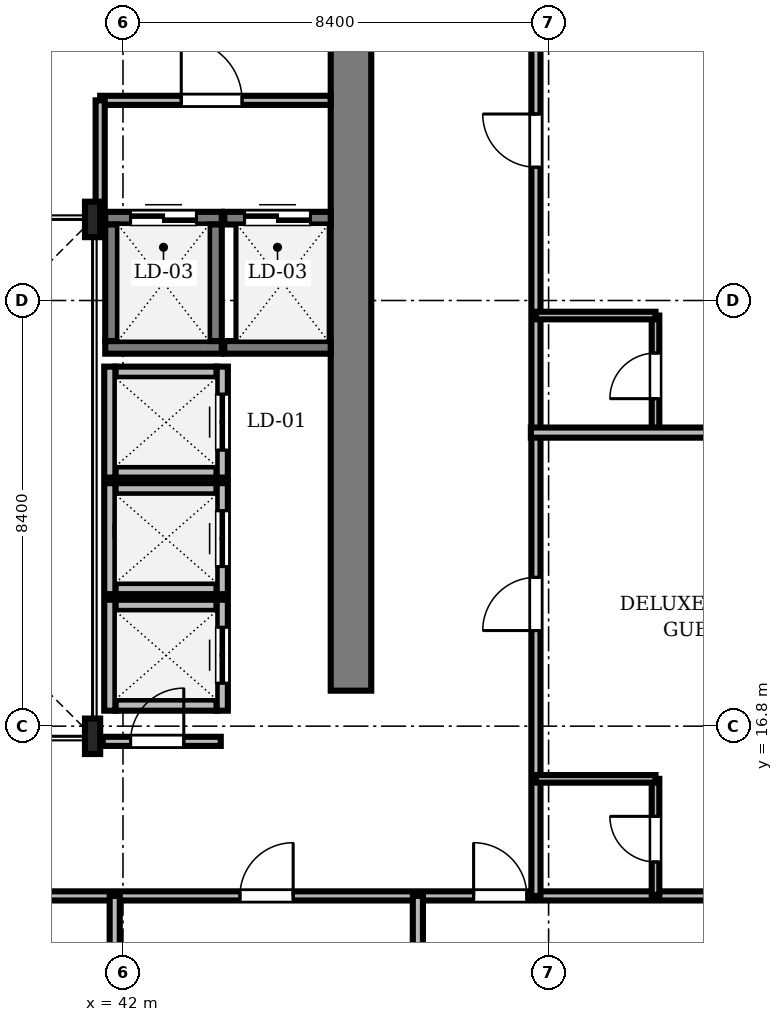
"""IFC4 building model, lengths in metres.
Left out: names, types, materials, properties, quantities, classifications, styles, units other than length and angle.
Written with IfcOpenShell. Run it as: python <this file> out.ifc"""

import sys

from ifc_helpers import new_model, si_unit, direction, frame, frame_2d, origin, origin_2d, place, context, subcontext, project, spatial, rectangle, i_section, extrude, source, transform, mapped, element, fill, save


model = new_model("IFC4")
c1 = context("Model", 3, precision=1e-05, world=origin(), true_north=direction((0.0, 1.0)))
c2 = subcontext(c1, "Body", "Model", "MODEL_VIEW")
j1 = project(units=[si_unit("LENGTHUNIT", "METRE"), si_unit("PLANEANGLEUNIT", "RADIAN")], contexts=[c1])
p1 = place(None, origin())
s1 = spatial("IfcSite", under=j1, at=p1, CompositionType="ELEMENT")
p2 = place(p1, origin())
s2 = spatial("IfcBuilding", under=s1, at=p2, CompositionType="ELEMENT")
p3 = place(p2, frame((0.0, 0.0, 203.55)))
s3 = spatial("IfcBuildingStorey", under=s2, at=p3, CompositionType="ELEMENT", Elevation=203.55)
m1 = source(origin(), c2, "Body", "SweptSolid", [
    extrude(rectangle(XDim=13.15, YDim=0.8, at=frame_2d((6.575, 0.0))), origin(), (0.0, 0.0, 1.0), 3.53),
])
p4 = place(p3, frame((46.5, 17.5, 0.0), z_axis=(0.0, 0.0, 1.0), x_axis=(0.0, 1.0, 0.0)))
e1 = element("IfcWall", 1, at=p4, inside=s3, PredefinedType="SHEAR", context=c2, shape_type="MappedRepresentation", body=[
    mapped(m1, transform((0.0, 0.0, 0.0), scale=1.0)),
])
m2 = source(origin(), c2, "Body", "SweptSolid", [
    extrude(i_section(OverallWidth=0.3, OverallDepth=0.7, WebThickness=0.017, FlangeThickness=0.032, FilletRadius=0.027, at=origin_2d()), origin(), (0.0, 0.0, 1.0), 3.53),
])
for number, where, z_axis, x_axis in (
    (2, (41.4, 16.6, 0.0), (0.0, 0.0, 1.0), (1.0, 0.0, 0.0)),
    (3, (41.4, 26.8, 0.0), (0.0, 0.0, 1.0), (1.0, 0.0, 0.0)),
):
    element("IfcColumn", number, at=place(p3, frame(where, z_axis=z_axis, x_axis=x_axis)), inside=s3, PredefinedType="COLUMN", context=c2, shape_type="MappedRepresentation", body=[
        mapped(m2, transform((0.0, 0.0, 0.0), scale=1.0)),
    ])
m3 = source(origin(), c2, "Body", "SweptSolid", [
    extrude(rectangle(XDim=2.0, YDim=0.22, at=frame_2d((1.0, 0.0))), origin(), (0.0, 0.0, 1.0), 3.53),
])
for number, where, z_axis, x_axis in (
    (4, (41.85, 21.815, 0.0), (0.0, 0.0, 1.0), (1.0, 0.0, 0.0)),
    (5, (41.85, 23.785, 0.0), (0.0, 0.0, 1.0), (1.0, 0.0, 0.0)),
):
    element("IfcWall", number, at=place(p3, frame(where, z_axis=z_axis, x_axis=x_axis)), inside=s3, PredefinedType="SOLIDWALL", context=c2, shape_type="MappedRepresentation", body=[
        mapped(m3, transform((0.0, 0.0, 0.0), scale=1.0)),
    ])
m4 = source(origin(), c2, "Body", "SweptSolid", [
    extrude(rectangle(XDim=2.19, YDim=0.22, at=frame_2d((1.095, 0.0))), origin(), (0.0, 0.0, 1.0), 3.53),
])
p5 = place(p3, frame((41.74, 21.705, 0.0), z_axis=(0.0, 0.0, 1.0), x_axis=(0.0, 1.0, 0.0)))
e6 = element("IfcWall", 6, at=p5, inside=s3, PredefinedType="SOLIDWALL", context=c2, shape_type="MappedRepresentation", body=[
    mapped(m4, transform((0.0, 0.0, 0.0), scale=1.0)),
])
p6 = place(p3, frame((43.96, 21.705, 0.0), z_axis=(0.0, 0.0, 1.0), x_axis=(0.0, 1.0, 0.0)))
e7 = element("IfcWall", 7, at=p6, inside=s3, PredefinedType="SOLIDWALL", context=c2, shape_type="MappedRepresentation", body=[
    mapped(m4, transform((0.0, 0.0, 0.0), scale=1.0)),
])
m5 = source(origin(), c2, "Body", "SweptSolid", [
    extrude(rectangle(XDim=1.1, YDim=2.2, at=frame_2d((0.55, 1.1))), frame((0.0, 0.12, 0.0), z_axis=(0.0, -1.0, 0.0), x_axis=(1.0, 0.0, 0.0)), (0.0, 0.0, 1.0), 0.24),
])
p7 = place(p6, frame((0.545, 0.0, 0.0)))
e8 = element("IfcOpeningElement", 8, at=p7, cuts=e7, PredefinedType="OPENING", context=c2, shape_type="MappedRepresentation", body=[
    mapped(m5, transform((0.0, 0.0, 0.0), scale=1.0)),
])
for number, where, z_axis, x_axis in (
    (9, (41.85, 19.515, 0.0), (0.0, 0.0, 1.0), (1.0, 0.0, 0.0)),
    (10, (41.85, 21.485, 0.0), (0.0, 0.0, 1.0), (1.0, 0.0, 0.0)),
):
    element("IfcWall", number, at=place(p3, frame(where, z_axis=z_axis, x_axis=x_axis)), inside=s3, PredefinedType="SOLIDWALL", context=c2, shape_type="MappedRepresentation", body=[
        mapped(m3, transform((0.0, 0.0, 0.0), scale=1.0)),
    ])
p8 = place(p3, frame((41.74, 19.405, 0.0), z_axis=(0.0, 0.0, 1.0), x_axis=(0.0, 1.0, 0.0)))
e11 = element("IfcWall", 11, at=p8, inside=s3, PredefinedType="SOLIDWALL", context=c2, shape_type="MappedRepresentation", body=[
    mapped(m4, transform((0.0, 0.0, 0.0), scale=1.0)),
])
p9 = place(p3, frame((43.96, 19.405, 0.0), z_axis=(0.0, 0.0, 1.0), x_axis=(0.0, 1.0, 0.0)))
e12 = element("IfcWall", 12, at=p9, inside=s3, PredefinedType="SOLIDWALL", context=c2, shape_type="MappedRepresentation", body=[
    mapped(m4, transform((0.0, 0.0, 0.0), scale=1.0)),
])
p10 = place(p9, frame((0.545, 0.0, 0.0)))
e13 = element("IfcOpeningElement", 13, at=p10, cuts=e12, PredefinedType="OPENING", context=c2, shape_type="MappedRepresentation", body=[
    mapped(m5, transform((0.0, 0.0, 0.0), scale=1.0)),
])
for number, where, z_axis, x_axis in (
    (14, (41.85, 17.215, 0.0), (0.0, 0.0, 1.0), (1.0, 0.0, 0.0)),
    (15, (41.85, 19.185, 0.0), (0.0, 0.0, 1.0), (1.0, 0.0, 0.0)),
):
    element("IfcWall", number, at=place(p3, frame(where, z_axis=z_axis, x_axis=x_axis)), inside=s3, PredefinedType="SOLIDWALL", context=c2, shape_type="MappedRepresentation", body=[
        mapped(m3, transform((0.0, 0.0, 0.0), scale=1.0)),
    ])
p11 = place(p3, frame((41.74, 17.105, 0.0), z_axis=(0.0, 0.0, 1.0), x_axis=(0.0, 1.0, 0.0)))
e16 = element("IfcWall", 16, at=p11, inside=s3, PredefinedType="SOLIDWALL", context=c2, shape_type="MappedRepresentation", body=[
    mapped(m4, transform((0.0, 0.0, 0.0), scale=1.0)),
])
p12 = place(p3, frame((43.96, 17.105, 0.0), z_axis=(0.0, 0.0, 1.0), x_axis=(0.0, 1.0, 0.0)))
e17 = element("IfcWall", 17, at=p12, inside=s3, PredefinedType="SOLIDWALL", context=c2, shape_type="MappedRepresentation", body=[
    mapped(m4, transform((0.0, 0.0, 0.0), scale=1.0)),
])
p13 = place(p12, frame((0.545, 0.0, 0.0)))
e18 = element("IfcOpeningElement", 18, at=p13, cuts=e17, PredefinedType="OPENING", context=c2, shape_type="MappedRepresentation", body=[
    mapped(m5, transform((0.0, 0.0, 0.0), scale=1.0)),
])
m6 = source(origin(), c2, "Body", "SweptSolid", [
    extrude(rectangle(XDim=2.3, YDim=0.25, at=frame_2d((1.15, 0.0))), origin(), (0.0, 0.0, 1.0), 3.53),
])
p14 = place(p3, frame((41.65, 24.275, 0.0), z_axis=(0.0, 0.0, 1.0), x_axis=(1.0, 0.0, 0.0)))
e19 = element("IfcWall", 19, at=p14, inside=s3, PredefinedType="SOLIDWALL", context=c2, shape_type="MappedRepresentation", body=[
    mapped(m6, transform((0.0, 0.0, 0.0), scale=1.0)),
])
p15 = place(p3, frame((41.65, 26.825, 0.0), z_axis=(0.0, 0.0, 1.0), x_axis=(1.0, 0.0, 0.0)))
e20 = element("IfcWall", 20, at=p15, inside=s3, PredefinedType="SOLIDWALL", context=c2, shape_type="MappedRepresentation", body=[
    mapped(m6, transform((0.0, 0.0, 0.0), scale=1.0)),
])
m7 = source(origin(), c2, "Body", "SweptSolid", [
    extrude(rectangle(XDim=1.3, YDim=2.3, at=frame_2d((0.65, 1.15))), frame((0.0, 0.135, 0.0), z_axis=(0.0, -1.0, 0.0), x_axis=(1.0, 0.0, 0.0)), (0.0, 0.0, 1.0), 0.27),
])
p16 = place(p15, frame((0.5, 0.0, 0.0)))
e21 = element("IfcOpeningElement", 21, at=p16, cuts=e20, PredefinedType="OPENING", context=c2, shape_type="MappedRepresentation", body=[
    mapped(m7, transform((0.0, 0.0, 0.0), scale=1.0)),
])
for number, where, z_axis, x_axis in (
    (22, (41.775, 24.4, 0.0), (0.0, 0.0, 1.0), (0.0, 1.0, 0.0)),
    (23, (43.825, 24.4, 0.0), (0.0, 0.0, 1.0), (0.0, 1.0, 0.0)),
):
    element("IfcWall", number, at=place(p3, frame(where, z_axis=z_axis, x_axis=x_axis)), inside=s3, PredefinedType="SOLIDWALL", context=c2, shape_type="MappedRepresentation", body=[
        mapped(m6, transform((0.0, 0.0, 0.0), scale=1.0)),
    ])
m8 = source(origin(), c2, "Body", "SweptSolid", [
    extrude(rectangle(XDim=2.1, YDim=0.25, at=frame_2d((1.05, 0.0))), origin(), (0.0, 0.0, 1.0), 3.53),
])
p17 = place(p3, frame((44.0, 24.275, 0.0), z_axis=(0.0, 0.0, 1.0), x_axis=(1.0, 0.0, 0.0)))
e24 = element("IfcWall", 24, at=p17, inside=s3, PredefinedType="SOLIDWALL", context=c2, shape_type="MappedRepresentation", body=[
    mapped(m8, transform((0.0, 0.0, 0.0), scale=1.0)),
])
p18 = place(p3, frame((44.0, 26.825, 0.0), z_axis=(0.0, 0.0, 1.0), x_axis=(1.0, 0.0, 0.0)))
e25 = element("IfcWall", 25, at=p18, inside=s3, PredefinedType="SOLIDWALL", context=c2, shape_type="MappedRepresentation", body=[
    mapped(m8, transform((0.0, 0.0, 0.0), scale=1.0)),
])
p19 = place(p18, frame((0.4, 0.0, 0.0)))
e26 = element("IfcOpeningElement", 26, at=p19, cuts=e25, PredefinedType="OPENING", context=c2, shape_type="MappedRepresentation", body=[
    mapped(m7, transform((0.0, 0.0, 0.0), scale=1.0)),
])
m9 = source(origin(), c2, "Body", "SweptSolid", [
    extrude(rectangle(XDim=46.156, YDim=0.18, at=frame_2d((23.078, 0.0))), origin(), (0.0, 0.0, 1.0), 2.772),
])
p20 = place(p3, frame((11.422, 13.45, 0.0), z_axis=(0.0, 0.0, 1.0), x_axis=(1.0, 0.0, 0.0)))
e27 = element("IfcWall", 27, at=p20, inside=s3, PredefinedType="PARTITIONING", context=c2, shape_type="MappedRepresentation", body=[
    mapped(m9, transform((0.0, 0.0, 0.0), scale=1.0)),
])
m10 = source(origin(), c2, "Body", "SweptSolid", [
    extrude(rectangle(XDim=1.05, YDim=2.2, at=frame_2d((0.525, 1.1))), frame((0.0, 0.1, 0.0), z_axis=(0.0, -1.0, 0.0), x_axis=(1.0, 0.0, 0.0)), (0.0, 0.0, 1.0), 0.2),
])
p21 = place(p20, frame((11.118, 0.0, 0.0)))
e28 = element("IfcOpeningElement", 28, at=p21, cuts=e27, PredefinedType="OPENING", context=c2, shape_type="MappedRepresentation", body=[
    mapped(m10, transform((0.0, 0.0, 0.0), scale=1.0)),
])
p22 = place(p20, frame((14.939, 0.0, 0.0)))
e29 = element("IfcOpeningElement", 29, at=p22, cuts=e27, PredefinedType="OPENING", context=c2, shape_type="MappedRepresentation", body=[
    mapped(m10, transform((0.0, 0.0, 0.0), scale=1.0)),
])
p23 = place(p20, frame((20.922, 0.0, 0.0)))
e30 = element("IfcOpeningElement", 30, at=p23, cuts=e27, PredefinedType="OPENING", context=c2, shape_type="MappedRepresentation", body=[
    mapped(m10, transform((0.0, 0.0, 0.0), scale=1.0)),
])
p24 = place(p20, frame((26.904, 0.0, 0.0)))
e31 = element("IfcOpeningElement", 31, at=p24, cuts=e27, PredefinedType="OPENING", context=c2, shape_type="MappedRepresentation", body=[
    mapped(m10, transform((0.0, 0.0, 0.0), scale=1.0)),
])
p25 = place(p20, frame((32.887, 0.0, 0.0)))
e32 = element("IfcOpeningElement", 32, at=p25, cuts=e27, PredefinedType="OPENING", context=c2, shape_type="MappedRepresentation", body=[
    mapped(m10, transform((0.0, 0.0, 0.0), scale=1.0)),
])
p26 = place(p20, frame((37.498, 0.0, 0.0)))
e33 = element("IfcOpeningElement", 33, at=p26, cuts=e27, PredefinedType="OPENING", context=c2, shape_type="MappedRepresentation", body=[
    mapped(m10, transform((0.0, 0.0, 0.0), scale=1.0)),
])
m11 = source(origin(), c2, "Body", "SweptSolid", [
    extrude(rectangle(XDim=27.65, YDim=0.18, at=frame_2d((13.825, 0.0))), origin(), (0.0, 0.0, 1.0), 2.972),
])
p27 = place(p3, frame((50.15, 13.45, 0.0), z_axis=(0.0, 0.0, 1.0), x_axis=(0.0, 1.0, 0.0)))
e34 = element("IfcWall", 34, at=p27, inside=s3, PredefinedType="PARTITIONING", context=c2, shape_type="MappedRepresentation", body=[
    mapped(m11, transform((0.0, 0.0, 0.0), scale=1.0)),
])
p28 = place(p27, frame((5.237, 0.0, 0.0)))
e35 = element("IfcOpeningElement", 35, at=p28, cuts=e34, PredefinedType="OPENING", context=c2, shape_type="MappedRepresentation", body=[
    mapped(m10, transform((0.0, 0.0, 0.0), scale=1.0)),
])
p29 = place(p27, frame((14.38, 0.0, 0.0)))
e36 = element("IfcOpeningElement", 36, at=p29, cuts=e34, PredefinedType="OPENING", context=c2, shape_type="MappedRepresentation", body=[
    mapped(m10, transform((0.0, 0.0, 0.0), scale=1.0)),
])
p30 = place(p27, frame((23.523, 0.0, 0.0)))
e37 = element("IfcOpeningElement", 37, at=p30, cuts=e34, PredefinedType="OPENING", context=c2, shape_type="MappedRepresentation", body=[
    mapped(m10, transform((0.0, 0.0, 0.0), scale=1.0)),
])
m12 = source(origin(), c2, "Body", "SweptSolid", [
    extrude(rectangle(XDim=4.548, YDim=0.18, at=frame_2d((2.274, 0.0))), origin(), (0.0, 0.0, 1.0), 3.162),
])
p31 = place(p3, frame((41.55, 29.15, 0.0), z_axis=(0.0, 0.0, 1.0), x_axis=(1.0, 0.0, 0.0)))
e38 = element("IfcWall", 38, at=p31, inside=s3, PredefinedType="PARTITIONING", context=c2, shape_type="MappedRepresentation", body=[
    mapped(m12, transform((0.0, 0.0, 0.0), scale=1.0)),
])
m13 = source(origin(), c2, "Body", "SweptSolid", [
    extrude(rectangle(XDim=1.2, YDim=2.2, at=frame_2d((0.6, 1.1))), frame((0.0, 0.1, 0.0), z_axis=(0.0, -1.0, 0.0), x_axis=(1.0, 0.0, 0.0)), (0.0, 0.0, 1.0), 0.2),
])
p32 = place(p31, frame((1.6, 0.0, 0.0)))
e39 = element("IfcOpeningElement", 39, at=p32, cuts=e38, PredefinedType="OPENING", context=c2, shape_type="MappedRepresentation", body=[
    mapped(m13, transform((0.0, 0.0, 0.0), scale=1.0)),
])
m14 = source(origin(), c2, "Body", "SweptSolid", [
    extrude(rectangle(XDim=2.33, YDim=0.18, at=frame_2d((1.165, 0.0))), origin(), (0.0, 0.0, 1.0), 2.972),
])
p33 = place(p3, frame((41.6, 16.5, 0.0), z_axis=(0.0, 0.0, 1.0), x_axis=(1.0, 0.0, 0.0)))
e40 = element("IfcWall", 40, at=p33, inside=s3, PredefinedType="PARTITIONING", context=c2, shape_type="MappedRepresentation", body=[
    mapped(m14, transform((0.0, 0.0, 0.0), scale=1.0)),
])
p34 = place(p33, frame((0.55, 0.0, 0.0)))
e41 = element("IfcOpeningElement", 41, at=p34, cuts=e40, PredefinedType="OPENING", context=c2, shape_type="MappedRepresentation", body=[
    mapped(m10, transform((0.0, 0.0, 0.0), scale=1.0)),
])
m15 = source(origin(), c2, "Body", "SweptSolid", [
    extrude(rectangle(XDim=2.29, YDim=0.15, at=frame_2d((1.145, 0.0))), origin(), (0.0, 0.0, 1.0), 2.972),
])
p35 = place(p3, frame((52.51, 13.47, 0.0), z_axis=(0.0, 0.0, 1.0), x_axis=(0.0, 1.0, 0.0)))
e42 = element("IfcWall", 42, at=p35, inside=s3, PredefinedType="PARTITIONING", context=c2, shape_type="MappedRepresentation", body=[
    mapped(m15, transform((0.0, 0.0, 0.0), scale=1.0)),
])
m16 = source(origin(), c2, "Body", "SweptSolid", [
    extrude(rectangle(XDim=0.9, YDim=2.1, at=frame_2d((0.45, 1.05))), frame((0.0, 0.085, 0.0), z_axis=(0.0, -1.0, 0.0), x_axis=(1.0, 0.0, 0.0)), (0.0, 0.0, 1.0), 0.17),
])
p36 = place(p35, frame((0.65, 0.0, 0.0)))
e43 = element("IfcOpeningElement", 43, at=p36, cuts=e42, PredefinedType="OPENING", context=c2, shape_type="MappedRepresentation", body=[
    mapped(m16, transform((0.0, 0.0, 0.0), scale=1.0)),
])
m17 = source(origin(), c2, "Body", "SweptSolid", [
    extrude(rectangle(XDim=2.29, YDim=0.15, at=frame_2d((1.145, 0.0))), origin(), (0.0, 0.0, 1.0), 3.192),
])
p37 = place(p3, frame((52.51, 22.613, 0.0), z_axis=(0.0, 0.0, 1.0), x_axis=(0.0, 1.0, 0.0)))
e44 = element("IfcWall", 44, at=p37, inside=s3, PredefinedType="PARTITIONING", context=c2, shape_type="MappedRepresentation", body=[
    mapped(m17, transform((0.0, 0.0, 0.0), scale=1.0)),
])
p38 = place(p37, frame((0.65, 0.0, 0.0)))
e45 = element("IfcOpeningElement", 45, at=p38, cuts=e44, PredefinedType="OPENING", context=c2, shape_type="MappedRepresentation", body=[
    mapped(m16, transform((0.0, 0.0, 0.0), scale=1.0)),
])
m18 = source(origin(), c2, "Body", "SweptSolid", [
    extrude(rectangle(XDim=11.328, YDim=0.2, at=frame_2d((5.664, 0.0))), origin(), (0.0, 0.0, 1.0), 2.772),
])
for number, where, z_axis, x_axis in (
    (46, (41.837, 2.122, 0.0), (0.0, 0.0, 1.0), (0.0, 1.0, 0.0)),
    (47, (47.82, 2.122, 0.0), (0.0, 0.0, 1.0), (0.0, 1.0, 0.0)),
):
    element("IfcWall", number, at=place(p3, frame(where, z_axis=z_axis, x_axis=x_axis)), inside=s3, PredefinedType="PARTITIONING", context=c2, shape_type="MappedRepresentation", body=[
        mapped(m18, transform((0.0, 0.0, 0.0), scale=1.0)),
    ])
m19 = source(origin(), c2, "Body", "SweptSolid", [
    extrude(rectangle(XDim=7.72, YDim=0.2, at=frame_2d((3.86, 0.0))), origin(), (0.0, 0.0, 1.0), 2.772),
])
p39 = place(p3, frame((50.05, 22.593, 0.0), z_axis=(0.0, 0.0, 1.0), x_axis=(1.0, 0.0, 0.0)))
e48 = element("IfcWall", 48, at=p39, inside=s3, PredefinedType="PARTITIONING", context=c2, shape_type="MappedRepresentation", body=[
    mapped(m19, transform((0.0, 0.0, 0.0), scale=1.0)),
])
m20 = source(origin(), c2, "Body", "SweptSolid", [
    extrude(rectangle(XDim=2.36, YDim=0.15, at=frame_2d((1.18, 0.0))), origin(), (0.0, 0.0, 1.0), 3.53),
])
for number, where, z_axis, x_axis in (
    (49, (50.15, 15.76, 0.0), (0.0, 0.0, 1.0), (1.0, 0.0, 0.0)),
    (50, (50.15, 24.903, 0.0), (0.0, 0.0, 1.0), (1.0, 0.0, 0.0)),
):
    element("IfcWall", number, at=place(p3, frame(where, z_axis=z_axis, x_axis=x_axis)), inside=s3, PredefinedType="PARTITIONING", context=c2, shape_type="MappedRepresentation", body=[
        mapped(m20, transform((0.0, 0.0, 0.0), scale=1.0)),
    ])
m21 = source(origin(), c2, "Body", "SweptSolid", [
    extrude(rectangle(XDim=2.35, YDim=0.18, at=frame_2d((1.175, 0.0))), origin(), (0.0, 0.0, 1.0), 2.972),
])
p40 = place(p3, frame((41.55, 26.8, 0.0), z_axis=(0.0, 0.0, 1.0), x_axis=(0.0, 1.0, 0.0)))
e51 = element("IfcWall", 51, at=p40, inside=s3, PredefinedType="PARTITIONING", context=c2, shape_type="MappedRepresentation", body=[
    mapped(m21, transform((0.0, 0.0, 0.0), scale=1.0)),
])
m22 = source(origin(), c2, "Body", "SweptSolid", [
    extrude(rectangle(XDim=1.858, YDim=0.18, at=frame_2d((0.929, 0.0))), origin(), (0.0, 0.0, 1.0), 3.53),
])
p41 = place(p3, frame((41.852, 20.65, 0.0), z_axis=(0.0, 0.0, 1.0), x_axis=(1.0, 0.0, 0.0)))
e52 = element("IfcWall", 52, at=p41, inside=s3, PredefinedType="PARTITIONING", context=c2, shape_type="MappedRepresentation", body=[
    mapped(m22, transform((0.0, 0.0, 0.0), scale=1.0)),
])
m23 = source(origin(), c2, "Body", "SweptSolid", [
    extrude(rectangle(XDim=1.1, YDim=2.2, at=frame_2d((0.55, 1.1))), frame((0.0, 0.025, 0.0), z_axis=(0.0, -1.0, 0.0), x_axis=(1.0, 0.0, 0.0)), (0.0, 0.0, 1.0), 0.05),
])
p42 = place(p7, origin())
e53 = element("IfcDoor", 53, at=p42, inside=s3, OperationType="DOUBLE_DOOR_SLIDING", PredefinedType="DOOR", context=c2, shape_type="MappedRepresentation", body=[
    mapped(m23, transform((0.0, 0.0, 0.0), scale=1.0)),
])
fill(e8, e53)
p43 = place(p10, origin())
e54 = element("IfcDoor", 54, at=p43, inside=s3, OperationType="DOUBLE_DOOR_SLIDING", PredefinedType="DOOR", context=c2, shape_type="MappedRepresentation", body=[
    mapped(m23, transform((0.0, 0.0, 0.0), scale=1.0)),
])
fill(e13, e54)
p44 = place(p13, origin())
e55 = element("IfcDoor", 55, at=p44, inside=s3, OperationType="DOUBLE_DOOR_SLIDING", PredefinedType="DOOR", context=c2, shape_type="MappedRepresentation", body=[
    mapped(m23, transform((0.0, 0.0, 0.0), scale=1.0)),
])
fill(e18, e55)
m24 = source(origin(), c2, "Body", "SweptSolid", [
    extrude(rectangle(XDim=1.3, YDim=2.3, at=frame_2d((0.65, 1.15))), frame((0.0, 0.025, 0.0), z_axis=(0.0, -1.0, 0.0), x_axis=(1.0, 0.0, 0.0)), (0.0, 0.0, 1.0), 0.05),
])
p45 = place(p16, origin())
e56 = element("IfcDoor", 56, at=p45, inside=s3, OperationType="DOUBLE_DOOR_SLIDING", PredefinedType="DOOR", context=c2, shape_type="MappedRepresentation", body=[
    mapped(m24, transform((0.0, 0.0, 0.0), scale=1.0)),
])
fill(e21, e56)
p46 = place(p19, origin())
e57 = element("IfcDoor", 57, at=p46, inside=s3, OperationType="DOUBLE_DOOR_SLIDING", PredefinedType="DOOR", context=c2, shape_type="MappedRepresentation", body=[
    mapped(m24, transform((0.0, 0.0, 0.0), scale=1.0)),
])
fill(e26, e57)
m25 = source(origin(), c2, "Body", "SweptSolid", [
    extrude(rectangle(XDim=1.05, YDim=2.2, at=frame_2d((0.525, 1.1))), frame((0.0, 0.025, 0.0), z_axis=(0.0, -1.0, 0.0), x_axis=(1.0, 0.0, 0.0)), (0.0, 0.0, 1.0), 0.05),
])
p47 = place(p25, origin())
e58 = element("IfcDoor", 58, at=p47, inside=s3, OperationType="SINGLE_SWING_RIGHT", PredefinedType="DOOR", context=c2, shape_type="MappedRepresentation", body=[
    mapped(m25, transform((0.0, 0.0, 0.0), scale=1.0)),
])
fill(e32, e58)
p48 = place(p26, origin())
e59 = element("IfcDoor", 59, at=p48, inside=s3, OperationType="SINGLE_SWING_LEFT", PredefinedType="DOOR", context=c2, shape_type="MappedRepresentation", body=[
    mapped(m25, transform((0.0, 0.0, 0.0), scale=1.0)),
])
fill(e33, e59)
p49 = place(p28, origin())
e60 = element("IfcDoor", 60, at=p49, inside=s3, OperationType="SINGLE_SWING_LEFT", PredefinedType="DOOR", context=c2, shape_type="MappedRepresentation", body=[
    mapped(m25, transform((0.0, 0.0, 0.0), scale=1.0)),
])
fill(e35, e60)
p50 = place(p29, origin())
e61 = element("IfcDoor", 61, at=p50, inside=s3, OperationType="SINGLE_SWING_RIGHT", PredefinedType="DOOR", context=c2, shape_type="MappedRepresentation", body=[
    mapped(m25, transform((0.0, 0.0, 0.0), scale=1.0)),
])
fill(e36, e61)
m26 = source(origin(), c2, "Body", "SweptSolid", [
    extrude(rectangle(XDim=1.2, YDim=2.2, at=frame_2d((0.6, 1.1))), frame((0.0, 0.025, 0.0), z_axis=(0.0, -1.0, 0.0), x_axis=(1.0, 0.0, 0.0)), (0.0, 0.0, 1.0), 0.05),
])
p51 = place(p32, origin())
e62 = element("IfcDoor", 62, at=p51, inside=s3, OperationType="SINGLE_SWING_LEFT", PredefinedType="DOOR", context=c2, shape_type="MappedRepresentation", body=[
    mapped(m26, transform((0.0, 0.0, 0.0), scale=1.0)),
])
fill(e39, e62)
p52 = place(p34, origin())
e63 = element("IfcDoor", 63, at=p52, inside=s3, OperationType="SINGLE_SWING_RIGHT", PredefinedType="DOOR", context=c2, shape_type="MappedRepresentation", body=[
    mapped(m25, transform((0.0, 0.0, 0.0), scale=1.0)),
])
fill(e41, e63)
m27 = source(origin(), c2, "Body", "SweptSolid", [
    extrude(rectangle(XDim=0.9, YDim=2.1, at=frame_2d((0.45, 1.05))), frame((0.0, 0.025, 0.0), z_axis=(0.0, -1.0, 0.0), x_axis=(1.0, 0.0, 0.0)), (0.0, 0.0, 1.0), 0.05),
])
p53 = place(p36, origin())
e64 = element("IfcDoor", 64, at=p53, inside=s3, OperationType="SINGLE_SWING_RIGHT", PredefinedType="DOOR", context=c2, shape_type="MappedRepresentation", body=[
    mapped(m27, transform((0.0, 0.0, 0.0), scale=1.0)),
])
fill(e43, e64)
p54 = place(p38, origin())
e65 = element("IfcDoor", 65, at=p54, inside=s3, OperationType="SINGLE_SWING_LEFT", PredefinedType="DOOR", context=c2, shape_type="MappedRepresentation", body=[
    mapped(m27, transform((0.0, 0.0, 0.0), scale=1.0)),
])
fill(e45, e65)
save(model, sys.argv[1])
